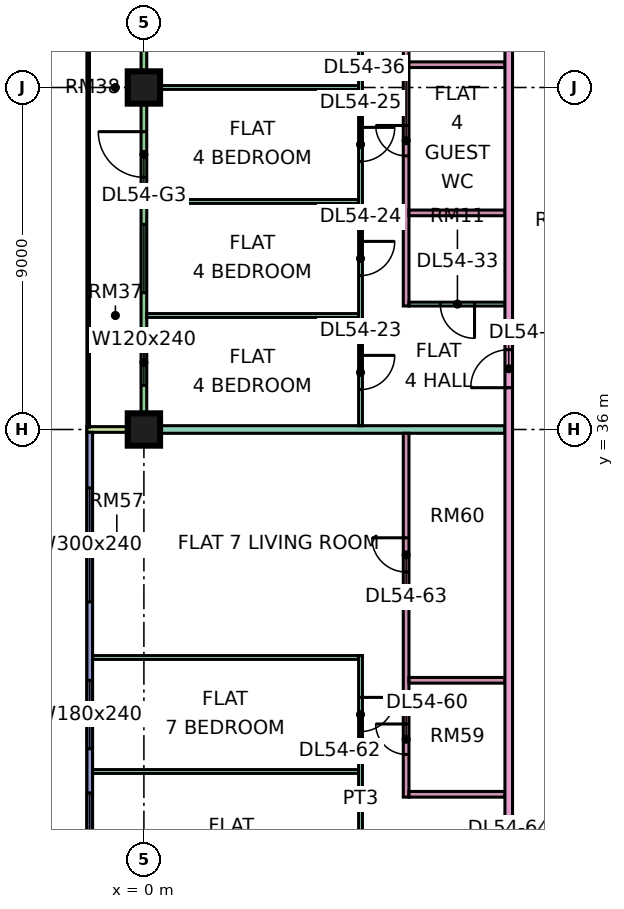
"""IFC4 building model, lengths in metres.
Left out: names, types, materials, properties, quantities, classifications, styles, units other than length and angle.
Written with IfcOpenShell. Run it as: python <this file> out.ifc"""

import sys

from ifc_helpers import new_model, si_unit, direction, frame, frame_2d, origin, origin_2d, place, context, subcontext, project, spatial, rectangle, extrude, element, fill, save


model = new_model("IFC4")
c1 = context("Model", 3, precision=1e-05, world=origin(), true_north=direction((0.0, 1.0)))
c2 = subcontext(c1, "Body", "Model", "MODEL_VIEW")
j1 = project(units=[si_unit("LENGTHUNIT", "METRE"), si_unit("PLANEANGLEUNIT", "RADIAN")], contexts=[c1])
p1 = place(None, origin())
s1 = spatial("IfcSite", under=j1, at=p1, CompositionType="ELEMENT")
p2 = place(p1, origin())
s2 = spatial("IfcBuilding", under=s1, at=p2, CompositionType="ELEMENT")
p3 = place(p2, frame((0.0, 0.0, 230.4)))
s3 = spatial("IfcBuildingStorey", under=s2, at=p3, CompositionType="ELEMENT", Elevation=230.4)
p4 = place(p3, frame((0.0, 36.0, 0.0), z_axis=(0.0, 0.0, 1.0), x_axis=(1.0, 0.0, 0.0)))
e1 = element("IfcColumn", 1, at=p4, inside=s3, PredefinedType="COLUMN", context=c2, shape_type="SweptSolid", body=[
    extrude(rectangle(XDim=0.85, YDim=0.85, at=origin_2d()), origin(), (0.0, 0.0, 1.0), 3.75),
])
p5 = place(p3, frame((0.0, 45.0, 0.0), z_axis=(0.0, 0.0, 1.0), x_axis=(1.0, 0.0, 0.0)))
e2 = element("IfcColumn", 2, at=p5, inside=s3, PredefinedType="COLUMN", context=c2, shape_type="SweptSolid", body=[
    extrude(rectangle(XDim=0.85, YDim=0.85, at=origin_2d()), origin(), (0.0, 0.0, 1.0), 3.75),
])
p6 = place(p3, frame((0.0, 47.925, 0.0), z_axis=(0.0, 0.0, 1.0), x_axis=(0.0, -1.0, 0.0)))
e3 = element("IfcWall", 3, at=p6, inside=s3, PredefinedType="SOLIDWALL", context=c2, shape_type="SweptSolid", body=[
    extrude(rectangle(XDim=11.85, YDim=0.15, at=frame_2d((5.925, 0.0))), origin(), (0.0, 0.0, 1.0), 3.35),
])
p7 = place(p6, frame((0.6, 0.0, 0.45)))
e4 = element("IfcOpeningElement", 4, at=p7, cuts=e3, PredefinedType="OPENING", context=c2, shape_type="SweptSolid", body=[
    extrude(rectangle(XDim=1.2, YDim=2.4, at=frame_2d((0.6, 1.2))), frame((0.0, 0.085, 0.0), z_axis=(0.0, -1.0, 0.0), x_axis=(1.0, 0.0, 0.0)), (0.0, 0.0, 1.0), 0.17),
])
p8 = place(p6, frame((4.087, 0.0, 0.0)))
e5 = element("IfcOpeningElement", 5, at=p8, cuts=e3, PredefinedType="OPENING", context=c2, shape_type="SweptSolid", body=[
    extrude(rectangle(XDim=1.2, YDim=2.4, at=frame_2d((0.6, 1.2))), frame((0.0, 0.085, 0.0), z_axis=(0.0, -1.0, 0.0), x_axis=(1.0, 0.0, 0.0)), (0.0, 0.0, 1.0), 0.17),
])
p9 = place(p6, frame((6.525, 0.0, 0.45)))
e6 = element("IfcOpeningElement", 6, at=p9, cuts=e3, PredefinedType="OPENING", context=c2, shape_type="SweptSolid", body=[
    extrude(rectangle(XDim=1.8, YDim=2.4, at=frame_2d((0.9, 1.2))), frame((0.0, 0.085, 0.0), z_axis=(0.0, -1.0, 0.0), x_axis=(1.0, 0.0, 0.0)), (0.0, 0.0, 1.0), 0.17),
])
p10 = place(p6, frame((9.562, 0.0, 0.45)))
e7 = element("IfcOpeningElement", 7, at=p10, cuts=e3, PredefinedType="OPENING", context=c2, shape_type="SweptSolid", body=[
    extrude(rectangle(XDim=1.2, YDim=2.4, at=frame_2d((0.6, 1.2))), frame((0.0, 0.085, 0.0), z_axis=(0.0, -1.0, 0.0), x_axis=(1.0, 0.0, 0.0)), (0.0, 0.0, 1.0), 0.17),
])
p11 = place(p3, frame((-1.5, 36.0, 0.0), z_axis=(0.0, 0.0, 1.0), x_axis=(1.0, 0.0, 0.0)))
e8 = element("IfcWall", 8, at=p11, inside=s3, PredefinedType="SOLIDWALL", context=c2, shape_type="SweptSolid", body=[
    extrude(rectangle(XDim=1.5, YDim=0.15, at=frame_2d((0.75, 0.0))), origin(), (0.0, 0.0, 1.0), 3.35),
])
p12 = place(p3, frame((-1.425, 35.925, 0.0), z_axis=(0.0, 0.0, 1.0), x_axis=(0.0, -1.0, 0.0)))
e9 = element("IfcWall", 9, at=p12, inside=s3, PredefinedType="SOLIDWALL", context=c2, shape_type="SweptSolid", body=[
    extrude(rectangle(XDim=11.85, YDim=0.15, at=frame_2d((5.925, 0.0))), origin(), (0.0, 0.0, 1.0), 3.35),
])
p13 = place(p12, frame((1.462, 0.0, 0.45)))
e10 = element("IfcOpeningElement", 10, at=p13, cuts=e9, PredefinedType="OPENING", context=c2, shape_type="SweptSolid", body=[
    extrude(rectangle(XDim=3.0, YDim=2.4, at=frame_2d((1.5, 1.2))), frame((0.0, 0.085, 0.0), z_axis=(0.0, -1.0, 0.0), x_axis=(1.0, 0.0, 0.0)), (0.0, 0.0, 1.0), 0.17),
])
p14 = place(p12, frame((6.525, 0.0, 0.45)))
e11 = element("IfcOpeningElement", 11, at=p14, cuts=e9, PredefinedType="OPENING", context=c2, shape_type="SweptSolid", body=[
    extrude(rectangle(XDim=1.8, YDim=2.4, at=frame_2d((0.9, 1.2))), frame((0.0, 0.085, 0.0), z_axis=(0.0, -1.0, 0.0), x_axis=(1.0, 0.0, 0.0)), (0.0, 0.0, 1.0), 0.17),
])
p15 = place(p12, frame((9.488, 0.0, 0.45)))
e12 = element("IfcOpeningElement", 12, at=p15, cuts=e9, PredefinedType="OPENING", context=c2, shape_type="SweptSolid", body=[
    extrude(rectangle(XDim=1.8, YDim=2.4, at=frame_2d((0.9, 1.2))), frame((0.0, 0.085, 0.0), z_axis=(0.0, -1.0, 0.0), x_axis=(1.0, 0.0, 0.0)), (0.0, 0.0, 1.0), 0.17),
])
p16 = place(p3, frame((-1.351, 27.0, 0.0), z_axis=(0.0, 0.0, 1.0), x_axis=(1.0, 0.0, 0.0)))
e13 = element("IfcWall", 13, at=p16, inside=s3, PredefinedType="PARTITIONING", context=c2, shape_type="SweptSolid", body=[
    extrude(rectangle(XDim=7.001, YDim=0.1, at=frame_2d((3.5, 0.0))), origin(), (0.0, 0.0, 1.0), 3.35),
])
p17 = place(p3, frame((-1.35, 30.0, 0.0), z_axis=(0.0, 0.0, 1.0), x_axis=(1.0, 0.0, 0.0)))
e14 = element("IfcWall", 14, at=p17, inside=s3, PredefinedType="PARTITIONING", context=c2, shape_type="SweptSolid", body=[
    extrude(rectangle(XDim=7.0, YDim=0.1, at=frame_2d((3.5, 0.0))), origin(), (0.0, 0.0, 1.0), 3.35),
])
e15 = element("IfcWall", 15, at=p4, inside=s3, PredefinedType="PARTITIONING", context=c2, shape_type="SweptSolid", body=[
    extrude(rectangle(XDim=9.5, YDim=0.2, at=frame_2d((4.75, 0.0))), origin(), (0.0, 0.0, 1.0), 3.35),
])
for number, where, z_axis, x_axis in (
    (16, (0.074, 39.0, 0.0), (0.0, 0.0, 1.0), (1.0, 0.0, 0.0)),
    (17, (0.074, 42.0, 0.0), (0.0, 0.0, 1.0), (1.0, 0.0, 0.0)),
    (18, (0.074, 45.0, 0.0), (0.0, 0.0, 1.0), (1.0, 0.0, 0.0)),
):
    element("IfcWall", number, at=place(p3, frame(where, z_axis=z_axis, x_axis=x_axis)), inside=s3, PredefinedType="PARTITIONING", context=c2, shape_type="SweptSolid", body=[
        extrude(rectangle(XDim=5.576, YDim=0.1, at=frame_2d((2.788, 0.0))), origin(), (0.0, 0.0, 1.0), 3.35),
    ])
p18 = place(p3, frame((5.7, 22.5, 0.0), z_axis=(0.0, 0.0, 1.0), x_axis=(0.0, 1.0, 0.0)))
e19 = element("IfcWall", 19, at=p18, inside=s3, PredefinedType="PARTITIONING", context=c2, shape_type="SweptSolid", body=[
    extrude(rectangle(XDim=7.55, YDim=0.1, at=frame_2d((3.775, 0.0))), origin(), (0.0, 0.0, 1.0), 3.35),
])
p19 = place(p18, frame((1.8, 0.0, 0.0)))
e20 = element("IfcOpeningElement", 20, at=p19, cuts=e19, PredefinedType="OPENING", context=c2, shape_type="SweptSolid", body=[
    extrude(rectangle(XDim=0.9, YDim=2.1, at=frame_2d((0.45, 1.05))), frame((0.0, 0.06, 0.0), z_axis=(0.0, -1.0, 0.0), x_axis=(1.0, 0.0, 0.0)), (0.0, 0.0, 1.0), 0.12),
])
p20 = place(p18, frame((5.55, 0.0, 0.0)))
e21 = element("IfcOpeningElement", 21, at=p20, cuts=e19, PredefinedType="OPENING", context=c2, shape_type="SweptSolid", body=[
    extrude(rectangle(XDim=0.9, YDim=2.1, at=frame_2d((0.45, 1.05))), frame((0.0, 0.06, 0.0), z_axis=(0.0, -1.0, 0.0), x_axis=(1.0, 0.0, 0.0)), (0.0, 0.0, 1.0), 0.12),
])
p21 = place(p3, frame((5.7, 36.1, 0.0), z_axis=(0.0, 0.0, 1.0), x_axis=(0.0, 1.0, 0.0)))
e22 = element("IfcWall", 22, at=p21, inside=s3, PredefinedType="PARTITIONING", context=c2, shape_type="SweptSolid", body=[
    extrude(rectangle(XDim=28.25, YDim=0.1, at=frame_2d((14.125, 0.0))), origin(), (0.0, 0.0, 1.0), 3.35),
])
p22 = place(p21, frame((0.95, 0.0, 0.0)))
e23 = element("IfcOpeningElement", 23, at=p22, cuts=e22, PredefinedType="OPENING", context=c2, shape_type="SweptSolid", body=[
    extrude(rectangle(XDim=0.9, YDim=2.1, at=frame_2d((0.45, 1.05))), frame((0.0, 0.06, 0.0), z_axis=(0.0, -1.0, 0.0), x_axis=(1.0, 0.0, 0.0)), (0.0, 0.0, 1.0), 0.12),
])
p23 = place(p21, frame((3.95, 0.0, 0.0)))
e24 = element("IfcOpeningElement", 24, at=p23, cuts=e22, PredefinedType="OPENING", context=c2, shape_type="SweptSolid", body=[
    extrude(rectangle(XDim=0.9, YDim=2.1, at=frame_2d((0.45, 1.05))), frame((0.0, 0.06, 0.0), z_axis=(0.0, -1.0, 0.0), x_axis=(1.0, 0.0, 0.0)), (0.0, 0.0, 1.0), 0.12),
])
p24 = place(p21, frame((6.95, 0.0, 0.0)))
e25 = element("IfcOpeningElement", 25, at=p24, cuts=e22, PredefinedType="OPENING", context=c2, shape_type="SweptSolid", body=[
    extrude(rectangle(XDim=0.9, YDim=2.1, at=frame_2d((0.45, 1.05))), frame((0.0, 0.06, 0.0), z_axis=(0.0, -1.0, 0.0), x_axis=(1.0, 0.0, 0.0)), (0.0, 0.0, 1.0), 0.12),
])
p25 = place(p21, frame((18.95, 0.0, 0.0)))
e26 = element("IfcOpeningElement", 26, at=p25, cuts=e22, PredefinedType="OPENING", context=c2, shape_type="SweptSolid", body=[
    extrude(rectangle(XDim=0.9, YDim=2.1, at=frame_2d((0.45, 1.05))), frame((0.0, 0.06, 0.0), z_axis=(0.0, -1.0, 0.0), x_axis=(1.0, 0.0, 0.0)), (0.0, 0.0, 1.0), 0.12),
])
p26 = place(p21, frame((21.95, 0.0, 0.0)))
e27 = element("IfcOpeningElement", 27, at=p26, cuts=e22, PredefinedType="OPENING", context=c2, shape_type="SweptSolid", body=[
    extrude(rectangle(XDim=0.9, YDim=2.1, at=frame_2d((0.45, 1.05))), frame((0.0, 0.06, 0.0), z_axis=(0.0, -1.0, 0.0), x_axis=(1.0, 0.0, 0.0)), (0.0, 0.0, 1.0), 0.12),
])
p27 = place(p21, frame((24.95, 0.0, 0.0)))
e28 = element("IfcOpeningElement", 28, at=p27, cuts=e22, PredefinedType="OPENING", context=c2, shape_type="SweptSolid", body=[
    extrude(rectangle(XDim=0.9, YDim=2.1, at=frame_2d((0.45, 1.05))), frame((0.0, 0.06, 0.0), z_axis=(0.0, -1.0, 0.0), x_axis=(1.0, 0.0, 0.0)), (0.0, 0.0, 1.0), 0.12),
])
p28 = place(p21, frame((12.95, 0.0, 0.0)))
e29 = element("IfcOpeningElement", 29, at=p28, cuts=e22, PredefinedType="OPENING", context=c2, shape_type="SweptSolid", body=[
    extrude(rectangle(XDim=0.9, YDim=2.1, at=frame_2d((0.45, 1.05))), frame((0.0, 0.06, 0.0), z_axis=(0.0, -1.0, 0.0), x_axis=(1.0, 0.0, 0.0)), (0.0, 0.0, 1.0), 0.12),
])
p29 = place(p3, frame((6.9, 26.325, 0.0), z_axis=(0.0, 0.0, 1.0), x_axis=(0.0, 1.0, 0.0)))
e30 = element("IfcWall", 30, at=p29, inside=s3, PredefinedType="PARTITIONING", context=c2, shape_type="SweptSolid", body=[
    extrude(rectangle(XDim=9.575, YDim=0.15, at=frame_2d((4.788, 0.0))), origin(), (0.0, 0.0, 1.0), 3.35),
])
p30 = place(p29, frame((1.125, 0.0, 0.0)))
e31 = element("IfcOpeningElement", 31, at=p30, cuts=e30, PredefinedType="OPENING", context=c2, shape_type="SweptSolid", body=[
    extrude(rectangle(XDim=0.8, YDim=2.1, at=frame_2d((0.4, 1.05))), frame((0.0, 0.085, 0.0), z_axis=(0.0, -1.0, 0.0), x_axis=(1.0, 0.0, 0.0)), (0.0, 0.0, 1.0), 0.17),
])
p31 = place(p29, frame((5.925, 0.0, 0.0)))
e32 = element("IfcOpeningElement", 32, at=p31, cuts=e30, PredefinedType="OPENING", context=c2, shape_type="SweptSolid", body=[
    extrude(rectangle(XDim=0.9, YDim=2.1, at=frame_2d((0.45, 1.05))), frame((0.0, 0.085, 0.0), z_axis=(0.0, -1.0, 0.0), x_axis=(1.0, 0.0, 0.0)), (0.0, 0.0, 1.0), 0.17),
])
p32 = place(p3, frame((6.9, 39.25, 0.0), z_axis=(0.0, 0.0, 1.0), x_axis=(0.0, 1.0, 0.0)))
e33 = element("IfcWall", 33, at=p32, inside=s3, PredefinedType="PARTITIONING", context=c2, shape_type="SweptSolid", body=[
    extrude(rectangle(XDim=25.1, YDim=0.15, at=frame_2d((12.55, 0.0))), origin(), (0.0, 0.0, 1.0), 3.35),
])
p33 = place(p32, frame((9.5, 0.0, 0.0)))
e34 = element("IfcOpeningElement", 34, at=p33, cuts=e33, PredefinedType="OPENING", context=c2, shape_type="SweptSolid", body=[
    extrude(rectangle(XDim=0.8, YDim=2.1, at=frame_2d((0.4, 1.05))), frame((0.0, 0.085, 0.0), z_axis=(0.0, -1.0, 0.0), x_axis=(1.0, 0.0, 0.0)), (0.0, 0.0, 1.0), 0.17),
])
p34 = place(p32, frame((12.65, 0.0, 0.0)))
e35 = element("IfcOpeningElement", 35, at=p34, cuts=e33, PredefinedType="OPENING", context=c2, shape_type="SweptSolid", body=[
    extrude(rectangle(XDim=0.9, YDim=2.1, at=frame_2d((0.45, 1.05))), frame((0.0, 0.085, 0.0), z_axis=(0.0, -1.0, 0.0), x_axis=(1.0, 0.0, 0.0)), (0.0, 0.0, 1.0), 0.17),
])
p35 = place(p32, frame((18.8, 0.0, 0.0)))
e36 = element("IfcOpeningElement", 36, at=p35, cuts=e33, PredefinedType="OPENING", context=c2, shape_type="SweptSolid", body=[
    extrude(rectangle(XDim=0.8, YDim=2.1, at=frame_2d((0.4, 1.05))), frame((0.0, 0.085, 0.0), z_axis=(0.0, -1.0, 0.0), x_axis=(1.0, 0.0, 0.0)), (0.0, 0.0, 1.0), 0.17),
])
p36 = place(p32, frame((6.8, 0.0, 0.0)))
e37 = element("IfcOpeningElement", 37, at=p36, cuts=e33, PredefinedType="OPENING", context=c2, shape_type="SweptSolid", body=[
    extrude(rectangle(XDim=0.9, YDim=2.1, at=frame_2d((0.45, 1.05))), frame((0.0, 0.085, 0.0), z_axis=(0.0, -1.0, 0.0), x_axis=(1.0, 0.0, 0.0)), (0.0, 0.0, 1.0), 0.17),
])
p37 = place(p32, frame((21.65, 0.0, 0.0)))
e38 = element("IfcOpeningElement", 38, at=p37, cuts=e33, PredefinedType="OPENING", context=c2, shape_type="SweptSolid", body=[
    extrude(rectangle(XDim=0.9, YDim=2.1, at=frame_2d((0.45, 1.05))), frame((0.0, 0.085, 0.0), z_axis=(0.0, -1.0, 0.0), x_axis=(1.0, 0.0, 0.0)), (0.0, 0.0, 1.0), 0.17),
])
p38 = place(p32, frame((3.95, 0.0, 0.0)))
e39 = element("IfcOpeningElement", 39, at=p38, cuts=e33, PredefinedType="OPENING", context=c2, shape_type="SweptSolid", body=[
    extrude(rectangle(XDim=0.8, YDim=2.1, at=frame_2d((0.4, 1.05))), frame((0.0, 0.085, 0.0), z_axis=(0.0, -1.0, 0.0), x_axis=(1.0, 0.0, 0.0)), (0.0, 0.0, 1.0), 0.17),
])
p39 = place(p32, frame((15.8, 0.0, 0.0)))
e40 = element("IfcOpeningElement", 40, at=p39, cuts=e33, PredefinedType="OPENING", context=c2, shape_type="SweptSolid", body=[
    extrude(rectangle(XDim=0.8, YDim=2.1, at=frame_2d((0.4, 1.05))), frame((0.0, 0.085, 0.0), z_axis=(0.0, -1.0, 0.0), x_axis=(1.0, 0.0, 0.0)), (0.0, 0.0, 1.0), 0.17),
])
for number, where, z_axis, x_axis in (
    (41, (6.975, 26.4, 0.0), (0.0, 0.0, 1.0), (1.0, 0.0, 0.0)),
    (42, (6.975, 29.4, 0.0), (0.0, 0.0, 1.0), (1.0, 0.0, 0.0)),
):
    element("IfcWall", number, at=place(p3, frame(where, z_axis=z_axis, x_axis=x_axis)), inside=s3, PredefinedType="PARTITIONING", context=c2, shape_type="SweptSolid", body=[
        extrude(rectangle(XDim=2.525, YDim=0.15, at=frame_2d((1.262, 0.0))), origin(), (0.0, 0.0, 1.0), 3.35),
    ])
p40 = place(p3, frame((6.975, 39.3, 0.0), z_axis=(0.0, 0.0, 1.0), x_axis=(1.0, 0.0, 0.0)))
e43 = element("IfcWall", 43, at=p40, inside=s3, PredefinedType="PARTITIONING", context=c2, shape_type="SweptSolid", body=[
    extrude(rectangle(XDim=2.525, YDim=0.1, at=frame_2d((1.262, 0.0))), origin(), (0.0, 0.0, 1.0), 3.35),
])
p41 = place(p40, frame((0.825, 0.0, 0.0)))
e44 = element("IfcOpeningElement", 44, at=p41, cuts=e43, PredefinedType="OPENING", context=c2, shape_type="SweptSolid", body=[
    extrude(rectangle(XDim=0.9, YDim=2.1, at=frame_2d((0.45, 1.05))), frame((0.0, 0.06, 0.0), z_axis=(0.0, -1.0, 0.0), x_axis=(1.0, 0.0, 0.0)), (0.0, 0.0, 1.0), 0.12),
])
for number, where, z_axis, x_axis in (
    (45, (6.975, 41.7, 0.0), (0.0, 0.0, 1.0), (1.0, 0.0, 0.0)),
    (46, (6.975, 45.6, 0.0), (0.0, 0.0, 1.0), (1.0, 0.0, 0.0)),
):
    element("IfcWall", number, at=place(p3, frame(where, z_axis=z_axis, x_axis=x_axis)), inside=s3, PredefinedType="PARTITIONING", context=c2, shape_type="SweptSolid", body=[
        extrude(rectangle(XDim=2.525, YDim=0.15, at=frame_2d((1.262, 0.0))), origin(), (0.0, 0.0, 1.0), 3.35),
    ])
p42 = place(p3, frame((9.6, 20.0, 0.0), z_axis=(0.0, 0.0, 1.0), x_axis=(0.0, 1.0, 0.0)))
e47 = element("IfcWall", 47, at=p42, inside=s3, PredefinedType="PARTITIONING", context=c2, shape_type="SweptSolid", body=[
    extrude(rectangle(XDim=44.35, YDim=0.2, at=frame_2d((22.175, 0.0))), origin(), (0.0, 0.0, 1.0), 3.35),
])
p43 = place(p42, frame((17.1, 0.0, 0.0)))
e48 = element("IfcOpeningElement", 48, at=p43, cuts=e47, PredefinedType="OPENING", context=c2, shape_type="SweptSolid", body=[
    extrude(rectangle(XDim=1.0, YDim=2.1, at=frame_2d((0.5, 1.05))), frame((0.0, 0.11, 0.0), z_axis=(0.0, -1.0, 0.0), x_axis=(1.0, 0.0, 0.0)), (0.0, 0.0, 1.0), 0.22),
])
p44 = place(p42, frame((0.6, 0.0, 0.0)))
e49 = element("IfcOpeningElement", 49, at=p44, cuts=e47, PredefinedType="OPENING", context=c2, shape_type="SweptSolid", body=[
    extrude(rectangle(XDim=1.2, YDim=2.1, at=frame_2d((0.6, 1.05))), frame((0.0, 0.11, 0.0), z_axis=(0.0, -1.0, 0.0), x_axis=(1.0, 0.0, 0.0)), (0.0, 0.0, 1.0), 0.22),
])
p45 = place(p42, frame((3.9, 0.0, 0.0)))
e50 = element("IfcOpeningElement", 50, at=p45, cuts=e47, PredefinedType="OPENING", context=c2, shape_type="SweptSolid", body=[
    extrude(rectangle(XDim=1.0, YDim=2.1, at=frame_2d((0.5, 1.05))), frame((0.0, 0.11, 0.0), z_axis=(0.0, -1.0, 0.0), x_axis=(1.0, 0.0, 0.0)), (0.0, 0.0, 1.0), 0.22),
])
p46 = place(p8, frame((1.2, 0.0, 0.0), z_axis=(0.0, 0.0, 1.0), x_axis=(-1.0, 0.0, 0.0)))
e51 = element("IfcDoor", 51, at=p46, inside=s3, OperationType="DOUBLE_DOOR_SINGLE_SWING", PredefinedType="DOOR", context=c2, shape_type="SweptSolid", body=[
    extrude(rectangle(XDim=1.2, YDim=2.4, at=frame_2d((0.6, 1.2))), frame((0.0, 0.025, 0.0), z_axis=(0.0, -1.0, 0.0), x_axis=(1.0, 0.0, 0.0)), (0.0, 0.0, 1.0), 0.05),
])
fill(e5, e51)
p47 = place(p9, origin())
e52 = element("IfcWindow", 52, at=p47, inside=s3, PartitioningType="SINGLE_PANEL", PredefinedType="WINDOW", context=c2, shape_type="SweptSolid", body=[
    extrude(rectangle(XDim=1.8, YDim=2.4, at=frame_2d((0.9, 1.2))), frame((0.0, 0.03, 0.0), z_axis=(0.0, -1.0, 0.0), x_axis=(1.0, 0.0, 0.0)), (0.0, 0.0, 1.0), 0.06),
])
fill(e6, e52)
p48 = place(p10, origin())
e53 = element("IfcWindow", 53, at=p48, inside=s3, PartitioningType="SINGLE_PANEL", PredefinedType="WINDOW", context=c2, shape_type="SweptSolid", body=[
    extrude(rectangle(XDim=1.2, YDim=2.4, at=frame_2d((0.6, 1.2))), frame((0.0, 0.03, 0.0), z_axis=(0.0, -1.0, 0.0), x_axis=(1.0, 0.0, 0.0)), (0.0, 0.0, 1.0), 0.06),
])
fill(e7, e53)
p49 = place(p13, origin())
e54 = element("IfcWindow", 54, at=p49, inside=s3, PartitioningType="SINGLE_PANEL", PredefinedType="WINDOW", context=c2, shape_type="SweptSolid", body=[
    extrude(rectangle(XDim=3.0, YDim=2.4, at=frame_2d((1.5, 1.2))), frame((0.0, 0.03, 0.0), z_axis=(0.0, -1.0, 0.0), x_axis=(1.0, 0.0, 0.0)), (0.0, 0.0, 1.0), 0.06),
])
fill(e10, e54)
p50 = place(p14, origin())
e55 = element("IfcWindow", 55, at=p50, inside=s3, PartitioningType="SINGLE_PANEL", PredefinedType="WINDOW", context=c2, shape_type="SweptSolid", body=[
    extrude(rectangle(XDim=1.8, YDim=2.4, at=frame_2d((0.9, 1.2))), frame((0.0, 0.03, 0.0), z_axis=(0.0, -1.0, 0.0), x_axis=(1.0, 0.0, 0.0)), (0.0, 0.0, 1.0), 0.06),
])
fill(e11, e55)
p51 = place(p15, origin())
e56 = element("IfcWindow", 56, at=p51, inside=s3, PartitioningType="SINGLE_PANEL", PredefinedType="WINDOW", context=c2, shape_type="SweptSolid", body=[
    extrude(rectangle(XDim=1.8, YDim=2.4, at=frame_2d((0.9, 1.2))), frame((0.0, 0.03, 0.0), z_axis=(0.0, -1.0, 0.0), x_axis=(1.0, 0.0, 0.0)), (0.0, 0.0, 1.0), 0.06),
])
fill(e12, e56)
p52 = place(p22, origin())
e57 = element("IfcDoor", 57, at=p52, inside=s3, OperationType="SINGLE_SWING_RIGHT", PredefinedType="DOOR", context=c2, shape_type="SweptSolid", body=[
    extrude(rectangle(XDim=0.9, YDim=2.1, at=frame_2d((0.45, 1.05))), frame((0.0, 0.025, 0.0), z_axis=(0.0, -1.0, 0.0), x_axis=(1.0, 0.0, 0.0)), (0.0, 0.0, 1.0), 0.05),
])
fill(e23, e57)
p53 = place(p23, origin())
e58 = element("IfcDoor", 58, at=p53, inside=s3, OperationType="SINGLE_SWING_RIGHT", PredefinedType="DOOR", context=c2, shape_type="SweptSolid", body=[
    extrude(rectangle(XDim=0.9, YDim=2.1, at=frame_2d((0.45, 1.05))), frame((0.0, 0.025, 0.0), z_axis=(0.0, -1.0, 0.0), x_axis=(1.0, 0.0, 0.0)), (0.0, 0.0, 1.0), 0.05),
])
fill(e24, e58)
p54 = place(p24, origin())
e59 = element("IfcDoor", 59, at=p54, inside=s3, OperationType="SINGLE_SWING_RIGHT", PredefinedType="DOOR", context=c2, shape_type="SweptSolid", body=[
    extrude(rectangle(XDim=0.9, YDim=2.1, at=frame_2d((0.45, 1.05))), frame((0.0, 0.025, 0.0), z_axis=(0.0, -1.0, 0.0), x_axis=(1.0, 0.0, 0.0)), (0.0, 0.0, 1.0), 0.05),
])
fill(e25, e59)
p55 = place(p43, origin())
e60 = element("IfcDoor", 60, at=p55, inside=s3, OperationType="SINGLE_SWING_LEFT", PredefinedType="DOOR", context=c2, shape_type="SweptSolid", body=[
    extrude(rectangle(XDim=1.0, YDim=2.1, at=frame_2d((0.5, 1.05))), frame((0.0, 0.025, 0.0), z_axis=(0.0, -1.0, 0.0), x_axis=(1.0, 0.0, 0.0)), (0.0, 0.0, 1.0), 0.05),
])
fill(e48, e60)
p56 = place(p41, origin())
e61 = element("IfcDoor", 61, at=p56, inside=s3, OperationType="SINGLE_SWING_RIGHT", PredefinedType="DOOR", context=c2, shape_type="SweptSolid", body=[
    extrude(rectangle(XDim=0.9, YDim=2.1, at=frame_2d((0.45, 1.05))), frame((0.0, 0.025, 0.0), z_axis=(0.0, -1.0, 0.0), x_axis=(1.0, 0.0, 0.0)), (0.0, 0.0, 1.0), 0.05),
])
fill(e44, e61)
p57 = place(p38, frame((0.8, 0.0, 0.0), z_axis=(0.0, 0.0, 1.0), x_axis=(-1.0, 0.0, 0.0)))
e62 = element("IfcDoor", 62, at=p57, inside=s3, OperationType="SINGLE_SWING_RIGHT", PredefinedType="DOOR", context=c2, shape_type="SweptSolid", body=[
    extrude(rectangle(XDim=0.8, YDim=2.1, at=frame_2d((0.4, 1.05))), frame((0.0, 0.025, 0.0), z_axis=(0.0, -1.0, 0.0), x_axis=(1.0, 0.0, 0.0)), (0.0, 0.0, 1.0), 0.05),
])
fill(e39, e62)
p58 = place(p30, frame((0.8, 0.0, 0.0), z_axis=(0.0, 0.0, 1.0), x_axis=(-1.0, 0.0, 0.0)))
e63 = element("IfcDoor", 63, at=p58, inside=s3, OperationType="SINGLE_SWING_RIGHT", PredefinedType="DOOR", context=c2, shape_type="SweptSolid", body=[
    extrude(rectangle(XDim=0.8, YDim=2.1, at=frame_2d((0.4, 1.05))), frame((0.0, 0.025, 0.0), z_axis=(0.0, -1.0, 0.0), x_axis=(1.0, 0.0, 0.0)), (0.0, 0.0, 1.0), 0.05),
])
fill(e31, e63)
p59 = place(p20, origin())
e64 = element("IfcDoor", 64, at=p59, inside=s3, OperationType="SINGLE_SWING_RIGHT", PredefinedType="DOOR", context=c2, shape_type="SweptSolid", body=[
    extrude(rectangle(XDim=0.9, YDim=2.1, at=frame_2d((0.45, 1.05))), frame((0.0, 0.025, 0.0), z_axis=(0.0, -1.0, 0.0), x_axis=(1.0, 0.0, 0.0)), (0.0, 0.0, 1.0), 0.05),
])
fill(e21, e64)
p60 = place(p31, frame((0.9, 0.0, 0.0), z_axis=(0.0, 0.0, 1.0), x_axis=(-1.0, 0.0, 0.0)))
e65 = element("IfcDoor", 65, at=p60, inside=s3, OperationType="SINGLE_SWING_RIGHT", PredefinedType="DOOR", context=c2, shape_type="SweptSolid", body=[
    extrude(rectangle(XDim=0.9, YDim=2.1, at=frame_2d((0.45, 1.05))), frame((0.0, 0.025, 0.0), z_axis=(0.0, -1.0, 0.0), x_axis=(1.0, 0.0, 0.0)), (0.0, 0.0, 1.0), 0.05),
])
fill(e32, e65)
save(model, sys.argv[1])
